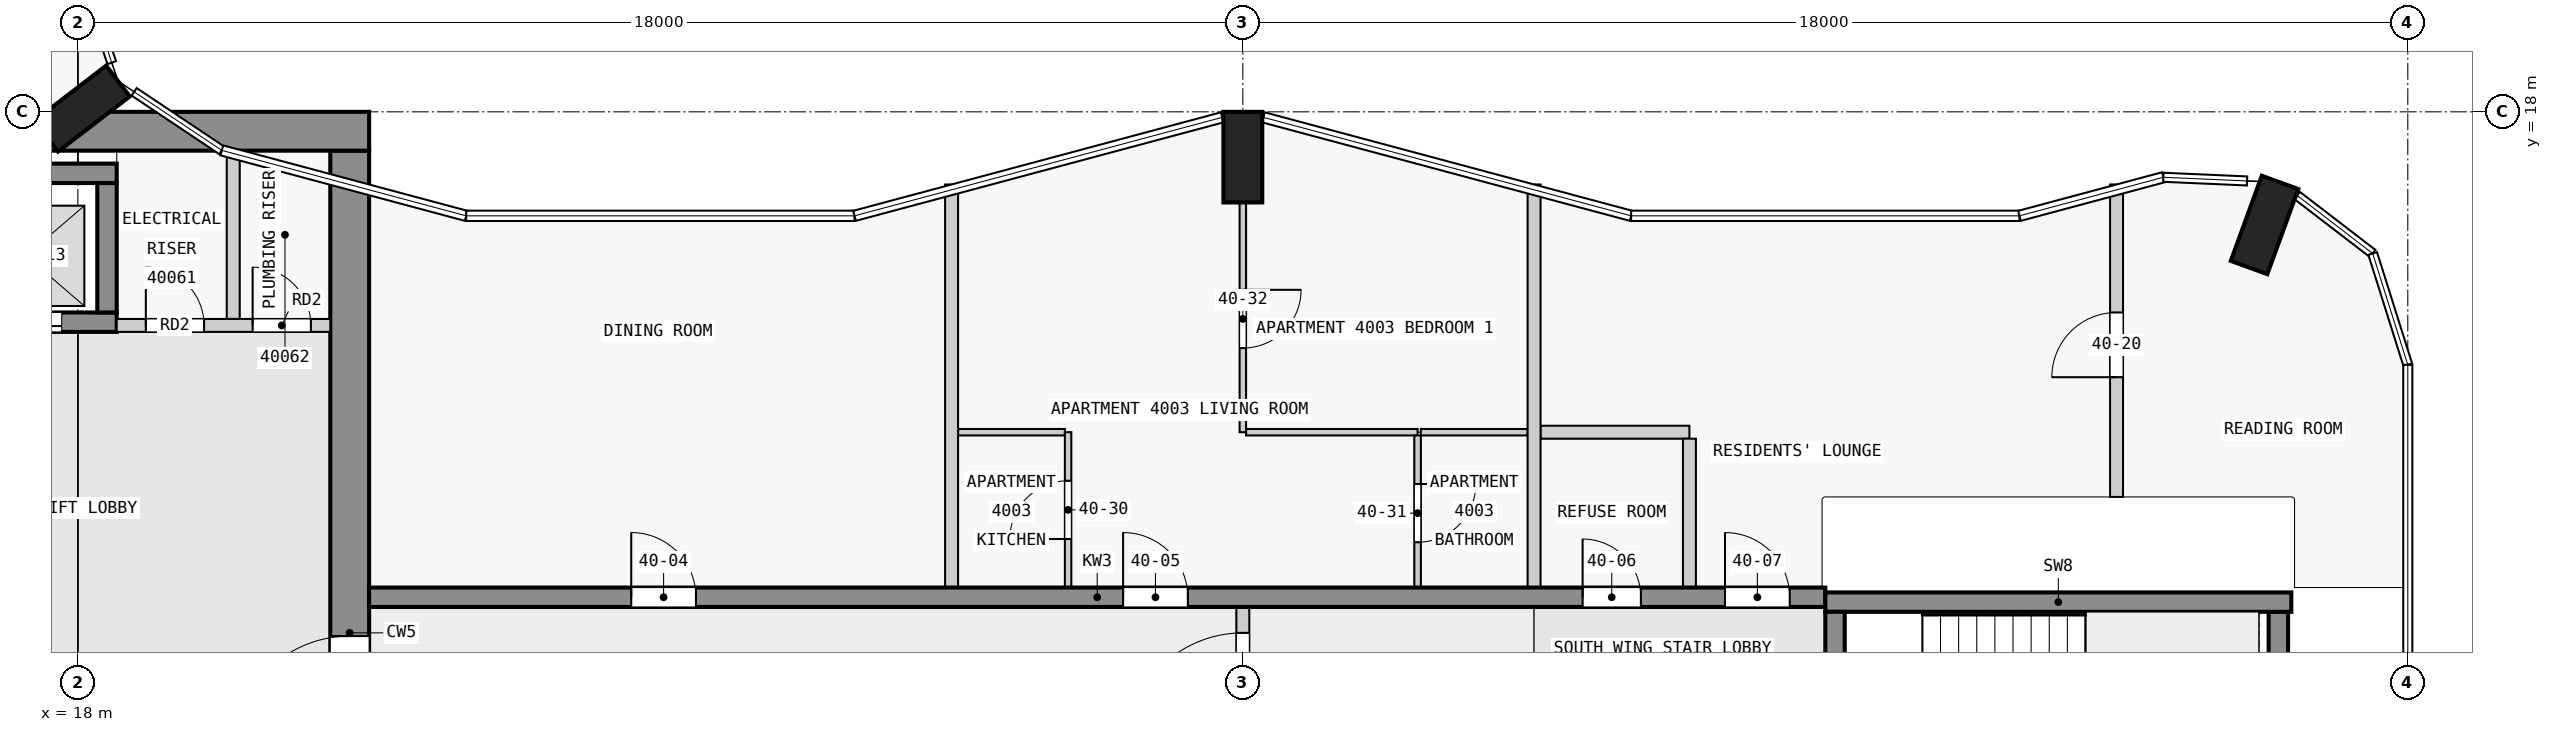
"""IFC4 building model, lengths in metres.
Left out: names, types, materials, properties, quantities, classifications, styles, units other than length and angle.
Written with IfcOpenShell. Run it as: python <this file> out.ifc"""

import sys

from ifc_helpers import new_model, si_unit, direction, frame, frame_2d, origin, origin_2d, place, context, subcontext, project, spatial, rectangle, extrude, element, fill, save


model = new_model("IFC4")
c1 = context("Model", 3, precision=1e-05, world=origin(), true_north=direction((0.0, 1.0)))
c2 = subcontext(c1, "Body", "Model", "MODEL_VIEW")
j1 = project(units=[si_unit("LENGTHUNIT", "METRE"), si_unit("PLANEANGLEUNIT", "RADIAN")], contexts=[c1])
p1 = place(None, origin())
s1 = spatial("IfcSite", under=j1, at=p1, CompositionType="ELEMENT")
p2 = place(p1, origin())
s2 = spatial("IfcBuilding", under=s1, at=p2, CompositionType="ELEMENT")
p3 = place(p2, frame((0.0, 0.0, 156.9)))
s3 = spatial("IfcBuildingStorey", under=s2, at=p3, CompositionType="ELEMENT", Elevation=156.9)
for number, where, z_axis, x_axis in (
    (1, (51.787, 16.252, 0.0), (0.0, 0.0, 1.0), (-0.94, 0.342, 0.0)),
    (2, (36.0, 17.3, 0.0), (0.0, 0.0, 1.0), (1.0, 0.0, 0.0)),
    (3, (18.065, 18.05, 0.0), (0.0, 0.0, 1.0), (-0.609, 0.793, 0.0)),
):
    element("IfcColumn", number, at=place(p3, frame(where, z_axis=z_axis, x_axis=x_axis)), inside=s3, PredefinedType="COLUMN", context=c2, shape_type="SweptSolid", body=[
        extrude(rectangle(XDim=0.6, YDim=1.4, at=origin_2d()), origin(), (0.0, 0.0, 1.0), 3.5),
    ])
p4 = place(p3, frame((1.38, 17.7, 0.0), z_axis=(0.0, 0.0, 1.0), x_axis=(1.0, 0.0, 0.0)))
e4 = element("IfcWall", 4, at=p4, inside=s3, PredefinedType="SHEAR", context=c2, shape_type="SweptSolid", body=[
    extrude(rectangle(XDim=21.12, YDim=0.6, at=frame_2d((10.56, 0.0))), origin(), (0.0, 0.0, 1.0), 3.25),
])
p5 = place(p4, frame((6.4, 0.0, 0.0)))
e5 = element("IfcOpeningElement", 5, at=p5, cuts=e4, PredefinedType="OPENING", context=c2, shape_type="SweptSolid", body=[
    extrude(rectangle(XDim=1.8, YDim=2.1, at=frame_2d((0.9, 1.05))), frame((0.0, 0.31, 0.0), z_axis=(0.0, -1.0, 0.0), x_axis=(1.0, 0.0, 0.0)), (0.0, 0.0, 1.0), 0.62),
])
p6 = place(p3, frame((22.2, 2.5, 0.0), z_axis=(0.0, 0.0, 1.0), x_axis=(0.0, 1.0, 0.0)))
e6 = element("IfcWall", 6, at=p6, inside=s3, PredefinedType="SHEAR", context=c2, shape_type="SweptSolid", body=[
    extrude(rectangle(XDim=14.9, YDim=0.6, at=frame_2d((7.45, 0.0))), origin(), (0.0, 0.0, 1.0), 3.25),
])
p7 = place(p6, frame((5.6, 0.0, 0.0)))
e7 = element("IfcOpeningElement", 7, at=p7, cuts=e6, PredefinedType="OPENING", context=c2, shape_type="SweptSolid", body=[
    extrude(rectangle(XDim=1.8, YDim=2.1, at=frame_2d((0.9, 1.05))), frame((0.0, 0.31, 0.0), z_axis=(0.0, -1.0, 0.0), x_axis=(1.0, 0.0, 0.0)), (0.0, 0.0, 1.0), 0.62),
])
p8 = place(p3, frame((10.8, 17.05, 0.0), z_axis=(0.0, 0.0, 1.0), x_axis=(1.0, 0.0, 0.0)))
e8 = element("IfcWall", 8, at=p8, inside=s3, PredefinedType="SHEAR", context=c2, shape_type="SweptSolid", body=[
    extrude(rectangle(XDim=7.8, YDim=0.3, at=frame_2d((3.9, 0.0))), origin(), (0.0, 0.0, 1.0), 3.25),
])
p9 = place(p3, frame((10.8, 14.75, 0.0), z_axis=(0.0, 0.0, 1.0), x_axis=(1.0, 0.0, 0.0)))
e9 = element("IfcWall", 9, at=p9, inside=s3, PredefinedType="SHEAR", context=c2, shape_type="SweptSolid", body=[
    extrude(rectangle(XDim=7.8, YDim=0.3, at=frame_2d((3.9, 0.0))), origin(), (0.0, 0.0, 1.0), 3.25),
])
p10 = place(p9, frame((0.85, 0.0, 0.0)))
e10 = element("IfcOpeningElement", 10, at=p10, cuts=e9, PredefinedType="OPENING", context=c2, shape_type="SweptSolid", body=[
    extrude(rectangle(XDim=1.1, YDim=2.1, at=frame_2d((0.55, 1.05))), frame((0.0, 0.16, 0.0), z_axis=(0.0, -1.0, 0.0), x_axis=(1.0, 0.0, 0.0)), (0.0, 0.0, 1.0), 0.32),
])
p11 = place(p9, frame((3.35, 0.0, 0.0)))
e11 = element("IfcOpeningElement", 11, at=p11, cuts=e9, PredefinedType="OPENING", context=c2, shape_type="SweptSolid", body=[
    extrude(rectangle(XDim=1.1, YDim=2.1, at=frame_2d((0.55, 1.05))), frame((0.0, 0.16, 0.0), z_axis=(0.0, -1.0, 0.0), x_axis=(1.0, 0.0, 0.0)), (0.0, 0.0, 1.0), 0.32),
])
p12 = place(p9, frame((5.85, 0.0, 0.0)))
e12 = element("IfcOpeningElement", 12, at=p12, cuts=e9, PredefinedType="OPENING", context=c2, shape_type="SweptSolid", body=[
    extrude(rectangle(XDim=1.1, YDim=2.1, at=frame_2d((0.55, 1.05))), frame((0.0, 0.16, 0.0), z_axis=(0.0, -1.0, 0.0), x_axis=(1.0, 0.0, 0.0)), (0.0, 0.0, 1.0), 0.32),
])
p13 = place(p3, frame((18.45, 14.9, 0.0), z_axis=(0.0, 0.0, 1.0), x_axis=(0.0, 1.0, 0.0)))
e13 = element("IfcWall", 13, at=p13, inside=s3, PredefinedType="SHEAR", context=c2, shape_type="SweptSolid", body=[
    extrude(rectangle(XDim=2.0, YDim=0.3, at=frame_2d((1.0, 0.0))), origin(), (0.0, 0.0, 1.0), 3.25),
])
p14 = place(p3, frame((45.15, 7.725, 0.0), z_axis=(0.0, 0.0, 1.0), x_axis=(0.0, 1.0, 0.0)))
e14 = element("IfcWall", 14, at=p14, inside=s3, PredefinedType="SHEAR", context=c2, shape_type="SweptSolid", body=[
    extrude(rectangle(XDim=2.55, YDim=0.3, at=frame_2d((1.275, 0.0))), origin(), (0.0, 0.0, 1.0), 3.5),
])
p15 = place(p14, frame((0.725, 0.0, 0.0)))
e15 = element("IfcOpeningElement", 15, at=p15, cuts=e14, PredefinedType="OPENING", context=c2, shape_type="SweptSolid", body=[
    extrude(rectangle(XDim=1.1, YDim=2.1, at=frame_2d((0.55, 1.05))), frame((0.0, 0.16, 0.0), z_axis=(0.0, -1.0, 0.0), x_axis=(1.0, 0.0, 0.0)), (0.0, 0.0, 1.0), 0.32),
])
p16 = place(p3, frame((52.0, 7.725, 0.0), z_axis=(0.0, 0.0, 1.0), x_axis=(0.0, 1.0, 0.0)))
e16 = element("IfcWall", 16, at=p16, inside=s3, PredefinedType="SHEAR", context=c2, shape_type="SweptSolid", body=[
    extrude(rectangle(XDim=2.55, YDim=0.3, at=frame_2d((1.275, 0.0))), origin(), (0.0, 0.0, 1.0), 3.5),
])
p17 = place(p3, frame((45.0, 10.425, 0.0), z_axis=(0.0, 0.0, 1.0), x_axis=(1.0, 0.0, 0.0)))
e17 = element("IfcWall", 17, at=p17, inside=s3, PredefinedType="SHEAR", context=c2, shape_type="SweptSolid", body=[
    extrude(rectangle(XDim=7.2, YDim=0.3, at=frame_2d((3.6, 0.0))), origin(), (0.0, 0.0, 1.0), 3.5),
])
p18 = place(p3, frame((22.5, 10.5, 0.0), z_axis=(0.0, 0.0, 1.0), x_axis=(1.0, 0.0, 0.0)))
e18 = element("IfcWall", 18, at=p18, inside=s3, PredefinedType="SHEAR", context=c2, shape_type="SweptSolid", body=[
    extrude(rectangle(XDim=22.5, YDim=0.3, at=frame_2d((11.25, 0.0))), origin(), (0.0, 0.0, 1.0), 3.25),
])
p19 = place(p18, frame((4.05, 0.0, 0.0)))
e19 = element("IfcOpeningElement", 19, at=p19, cuts=e18, PredefinedType="OPENING", context=c2, shape_type="SweptSolid", body=[
    extrude(rectangle(XDim=1.0, YDim=2.1, at=frame_2d((0.5, 1.05))), frame((0.0, 0.16, 0.0), z_axis=(0.0, -1.0, 0.0), x_axis=(1.0, 0.0, 0.0)), (0.0, 0.0, 1.0), 0.32),
])
p20 = place(p18, frame((11.65, 0.0, 0.0)))
e20 = element("IfcOpeningElement", 20, at=p20, cuts=e18, PredefinedType="OPENING", context=c2, shape_type="SweptSolid", body=[
    extrude(rectangle(XDim=1.0, YDim=2.1, at=frame_2d((0.5, 1.05))), frame((0.0, 0.16, 0.0), z_axis=(0.0, -1.0, 0.0), x_axis=(1.0, 0.0, 0.0)), (0.0, 0.0, 1.0), 0.32),
])
p21 = place(p18, frame((18.75, 0.0, 0.0)))
e21 = element("IfcOpeningElement", 21, at=p21, cuts=e18, PredefinedType="OPENING", context=c2, shape_type="SweptSolid", body=[
    extrude(rectangle(XDim=0.9, YDim=2.1, at=frame_2d((0.45, 1.05))), frame((0.0, 0.16, 0.0), z_axis=(0.0, -1.0, 0.0), x_axis=(1.0, 0.0, 0.0)), (0.0, 0.0, 1.0), 0.32),
])
p22 = place(p18, frame((20.95, 0.0, 0.0)))
e22 = element("IfcOpeningElement", 22, at=p22, cuts=e18, PredefinedType="OPENING", context=c2, shape_type="SweptSolid", body=[
    extrude(rectangle(XDim=1.0, YDim=2.1, at=frame_2d((0.5, 1.05))), frame((0.0, 0.16, 0.0), z_axis=(0.0, -1.0, 0.0), x_axis=(1.0, 0.0, 0.0)), (0.0, 0.0, 1.0), 0.32),
])
p23 = place(p3, frame((18.6, 14.7, 0.0), z_axis=(0.0, 0.0, 1.0), x_axis=(1.0, 0.0, 0.0)))
e23 = element("IfcWall", 23, at=p23, inside=s3, PredefinedType="PARTITIONING", context=c2, shape_type="SweptSolid", body=[
    extrude(rectangle(XDim=3.3, YDim=0.2, at=frame_2d((1.65, 0.0))), origin(), (0.0, 0.0, 1.0), 3.25),
])
p24 = place(p23, frame((0.45, 0.0, 0.0)))
e24 = element("IfcOpeningElement", 24, at=p24, cuts=e23, PredefinedType="OPENING", context=c2, shape_type="SweptSolid", body=[
    extrude(rectangle(XDim=0.9, YDim=2.1, at=frame_2d((0.45, 1.05))), frame((0.0, 0.11, 0.0), z_axis=(0.0, -1.0, 0.0), x_axis=(1.0, 0.0, 0.0)), (0.0, 0.0, 1.0), 0.22),
])
p25 = place(p23, frame((2.1, 0.0, 0.0)))
e25 = element("IfcOpeningElement", 25, at=p25, cuts=e23, PredefinedType="OPENING", context=c2, shape_type="SweptSolid", body=[
    extrude(rectangle(XDim=0.9, YDim=2.1, at=frame_2d((0.45, 1.05))), frame((0.0, 0.11, 0.0), z_axis=(0.0, -1.0, 0.0), x_axis=(1.0, 0.0, 0.0)), (0.0, 0.0, 1.0), 0.22),
])
p26 = place(p3, frame((20.4, 14.8, 0.0), z_axis=(0.0, 0.0, 1.0), x_axis=(0.0, 1.0, 0.0)))
e26 = element("IfcWall", 26, at=p26, inside=s3, PredefinedType="PARTITIONING", context=c2, shape_type="SweptSolid", body=[
    extrude(rectangle(XDim=2.6, YDim=0.2, at=frame_2d((1.3, 0.0))), origin(), (0.0, 0.0, 1.0), 3.25),
])
for number, where, z_axis, x_axis in (
    (27, (33.25, 13.05, 0.0), (0.0, 0.0, 1.0), (-1.0, 0.0, 0.0)),
    (28, (40.4, 13.05, 0.0), (0.0, 0.0, 1.0), (-1.0, 0.0, 0.0)),
):
    element("IfcWall", number, at=place(p3, frame(where, z_axis=z_axis, x_axis=x_axis)), inside=s3, PredefinedType="PARTITIONING", context=c2, shape_type="SweptSolid", body=[
        extrude(rectangle(XDim=1.65, YDim=0.1, at=frame_2d((0.825, 0.0))), origin(), (0.0, 0.0, 1.0), 3.25),
    ])
p27 = place(p3, frame((36.05, 13.05, 0.0), z_axis=(0.0, 0.0, 1.0), x_axis=(1.0, 0.0, 0.0)))
e29 = element("IfcWall", 29, at=p27, inside=s3, PredefinedType="PARTITIONING", context=c2, shape_type="SweptSolid", body=[
    extrude(rectangle(XDim=2.65, YDim=0.1, at=frame_2d((1.325, 0.0))), origin(), (0.0, 0.0, 1.0), 3.25),
])
p28 = place(p3, frame((42.9, 13.05, 0.0), z_axis=(0.0, 0.0, 1.0), x_axis=(-1.0, 0.0, 0.0)))
e30 = element("IfcWall", 30, at=p28, inside=s3, PredefinedType="PARTITIONING", context=c2, shape_type="SweptSolid", body=[
    extrude(rectangle(XDim=2.3, YDim=0.2, at=frame_2d((1.15, 0.0))), origin(), (0.0, 0.0, 1.0), 3.25),
])
p29 = place(p3, frame((31.5, 10.65, 0.0), z_axis=(0.0, 0.0, 1.0), x_axis=(0.0, 1.0, 0.0)))
e31 = element("IfcWall", 31, at=p29, inside=s3, PredefinedType="PARTITIONING", context=c2, shape_type="SweptSolid", body=[
    extrude(rectangle(XDim=6.228, YDim=0.2, at=frame_2d((3.114, 0.0))), origin(), (0.0, 0.0, 1.0), 3.25),
])
p30 = place(p3, frame((33.3, 10.65, 0.0), z_axis=(0.0, 0.0, 1.0), x_axis=(0.0, 1.0, 0.0)))
e32 = element("IfcWall", 32, at=p30, inside=s3, PredefinedType="PARTITIONING", context=c2, shape_type="SweptSolid", body=[
    extrude(rectangle(XDim=2.4, YDim=0.1, at=frame_2d((1.2, 0.0))), origin(), (0.0, 0.0, 1.0), 3.25),
])
p31 = place(p30, frame((0.75, 0.0, 0.0)))
e33 = element("IfcOpeningElement", 33, at=p31, cuts=e32, PredefinedType="OPENING", context=c2, shape_type="SweptSolid", body=[
    extrude(rectangle(XDim=0.9, YDim=2.1, at=frame_2d((0.45, 1.05))), frame((0.0, 0.06, 0.0), z_axis=(0.0, -1.0, 0.0), x_axis=(1.0, 0.0, 0.0)), (0.0, 0.0, 1.0), 0.12),
])
p32 = place(p3, frame((36.0, 16.6, 0.0), z_axis=(0.0, 0.0, 1.0), x_axis=(0.0, -1.0, 0.0)))
e34 = element("IfcWall", 34, at=p32, inside=s3, PredefinedType="PARTITIONING", context=c2, shape_type="SweptSolid", body=[
    extrude(rectangle(XDim=3.55, YDim=0.1, at=frame_2d((1.775, 0.0))), origin(), (0.0, 0.0, 1.0), 3.25),
])
p33 = place(p32, frame((1.35, 0.0, 0.0)))
e35 = element("IfcOpeningElement", 35, at=p33, cuts=e34, PredefinedType="OPENING", context=c2, shape_type="SweptSolid", body=[
    extrude(rectangle(XDim=0.9, YDim=2.1, at=frame_2d((0.45, 1.05))), frame((0.0, 0.06, 0.0), z_axis=(0.0, -1.0, 0.0), x_axis=(1.0, 0.0, 0.0)), (0.0, 0.0, 1.0), 0.12),
])
p34 = place(p3, frame((38.7, 13.0, 0.0), z_axis=(0.0, 0.0, 1.0), x_axis=(0.0, -1.0, 0.0)))
e36 = element("IfcWall", 36, at=p34, inside=s3, PredefinedType="PARTITIONING", context=c2, shape_type="SweptSolid", body=[
    extrude(rectangle(XDim=2.35, YDim=0.1, at=frame_2d((1.175, 0.0))), origin(), (0.0, 0.0, 1.0), 3.25),
])
p35 = place(p34, frame((0.75, 0.0, 0.0)))
e37 = element("IfcOpeningElement", 37, at=p35, cuts=e36, PredefinedType="OPENING", context=c2, shape_type="SweptSolid", body=[
    extrude(rectangle(XDim=0.9, YDim=2.1, at=frame_2d((0.45, 1.05))), frame((0.0, 0.06, 0.0), z_axis=(0.0, -1.0, 0.0), x_axis=(1.0, 0.0, 0.0)), (0.0, 0.0, 1.0), 0.12),
])
p36 = place(p3, frame((40.5, 10.65, 0.0), z_axis=(0.0, 0.0, 1.0), x_axis=(0.0, 1.0, 0.0)))
e38 = element("IfcWall", 38, at=p36, inside=s3, PredefinedType="PARTITIONING", context=c2, shape_type="SweptSolid", body=[
    extrude(rectangle(XDim=6.228, YDim=0.2, at=frame_2d((3.114, 0.0))), origin(), (0.0, 0.0, 1.0), 3.25),
])
p37 = place(p3, frame((42.9, 10.65, 0.0), z_axis=(0.0, 0.0, 1.0), x_axis=(0.0, 1.0, 0.0)))
e39 = element("IfcWall", 39, at=p37, inside=s3, PredefinedType="PARTITIONING", context=c2, shape_type="SweptSolid", body=[
    extrude(rectangle(XDim=2.3, YDim=0.2, at=frame_2d((1.15, 0.0))), origin(), (0.0, 0.0, 1.0), 3.25),
])
p38 = place(p3, frame((49.5, 12.05, 0.0), z_axis=(0.0, 0.0, 1.0), x_axis=(0.0, 1.0, 0.0)))
e40 = element("IfcWall", 40, at=p38, inside=s3, PredefinedType="PARTITIONING", context=c2, shape_type="SweptSolid", body=[
    extrude(rectangle(XDim=4.828, YDim=0.2, at=frame_2d((2.414, 0.0))), origin(), (0.0, 0.0, 1.0), 3.25),
])
p39 = place(p38, frame((1.85, 0.0, 0.0)))
e41 = element("IfcOpeningElement", 41, at=p39, cuts=e40, PredefinedType="OPENING", context=c2, shape_type="SweptSolid", body=[
    extrude(rectangle(XDim=1.0, YDim=2.1, at=frame_2d((0.5, 1.05))), frame((0.0, 0.11, 0.0), z_axis=(0.0, -1.0, 0.0), x_axis=(1.0, 0.0, 0.0)), (0.0, 0.0, 1.0), 0.22),
])
p40 = place(p3, frame((36.0, 7.45, 0.0), z_axis=(0.0, 0.0, 1.0), x_axis=(0.0, 1.0, 0.0)))
e42 = element("IfcWall", 42, at=p40, inside=s3, PredefinedType="PARTITIONING", context=c2, shape_type="SweptSolid", body=[
    extrude(rectangle(XDim=3.2, YDim=0.2, at=frame_2d((1.6, 0.0))), origin(), (0.0, 0.0, 1.0), 3.25),
])
p41 = place(p40, frame((0.7, 0.0, 0.0)))
e43 = element("IfcOpeningElement", 43, at=p41, cuts=e42, PredefinedType="OPENING", context=c2, shape_type="SweptSolid", body=[
    extrude(rectangle(XDim=1.8, YDim=2.1, at=frame_2d((0.9, 1.05))), frame((0.0, 0.11, 0.0), z_axis=(0.0, -1.0, 0.0), x_axis=(1.0, 0.0, 0.0)), (0.0, 0.0, 1.0), 0.22),
])
p42 = place(p12, origin())
e44 = element("IfcDoor", 44, at=p42, inside=s3, OperationType="DOUBLE_DOOR_SLIDING", PredefinedType="DOOR", context=c2, shape_type="SweptSolid", body=[
    extrude(rectangle(XDim=1.1, YDim=2.1, at=frame_2d((0.55, 1.05))), frame((0.0, 0.025, 0.0), z_axis=(0.0, -1.0, 0.0), x_axis=(1.0, 0.0, 0.0)), (0.0, 0.0, 1.0), 0.05),
])
fill(e12, e44)
p43 = place(p7, origin())
e45 = element("IfcDoor", 45, at=p43, inside=s3, OperationType="DOUBLE_DOOR_SINGLE_SWING", PredefinedType="DOOR", context=c2, shape_type="SweptSolid", body=[
    extrude(rectangle(XDim=1.8, YDim=2.1, at=frame_2d((0.9, 1.05))), frame((0.0, 0.025, 0.0), z_axis=(0.0, -1.0, 0.0), x_axis=(1.0, 0.0, 0.0)), (0.0, 0.0, 1.0), 0.05),
])
fill(e7, e45)
p44 = place(p24, origin())
e46 = element("IfcDoor", 46, at=p44, inside=s3, OperationType="SINGLE_SWING_LEFT", PredefinedType="DOOR", context=c2, shape_type="SweptSolid", body=[
    extrude(rectangle(XDim=0.9, YDim=2.1, at=frame_2d((0.45, 1.05))), frame((0.0, 0.025, 0.0), z_axis=(0.0, -1.0, 0.0), x_axis=(1.0, 0.0, 0.0)), (0.0, 0.0, 1.0), 0.05),
])
fill(e24, e46)
p45 = place(p25, origin())
e47 = element("IfcDoor", 47, at=p45, inside=s3, OperationType="SINGLE_SWING_LEFT", PredefinedType="DOOR", context=c2, shape_type="SweptSolid", body=[
    extrude(rectangle(XDim=0.9, YDim=2.1, at=frame_2d((0.45, 1.05))), frame((0.0, 0.025, 0.0), z_axis=(0.0, -1.0, 0.0), x_axis=(1.0, 0.0, 0.0)), (0.0, 0.0, 1.0), 0.05),
])
fill(e25, e47)
p46 = place(p19, origin())
e48 = element("IfcDoor", 48, at=p46, inside=s3, OperationType="SINGLE_SWING_LEFT", PredefinedType="DOOR", context=c2, shape_type="SweptSolid", body=[
    extrude(rectangle(XDim=1.0, YDim=2.1, at=frame_2d((0.5, 1.05))), frame((0.0, 0.025, 0.0), z_axis=(0.0, -1.0, 0.0), x_axis=(1.0, 0.0, 0.0)), (0.0, 0.0, 1.0), 0.05),
])
fill(e19, e48)
p47 = place(p20, origin())
e49 = element("IfcDoor", 49, at=p47, inside=s3, OperationType="SINGLE_SWING_RIGHT", PredefinedType="DOOR", context=c2, shape_type="SweptSolid", body=[
    extrude(rectangle(XDim=1.0, YDim=2.1, at=frame_2d((0.5, 1.05))), frame((0.0, 0.025, 0.0), z_axis=(0.0, -1.0, 0.0), x_axis=(1.0, 0.0, 0.0)), (0.0, 0.0, 1.0), 0.05),
])
fill(e20, e49)
p48 = place(p21, origin())
e50 = element("IfcDoor", 50, at=p48, inside=s3, OperationType="SINGLE_SWING_RIGHT", PredefinedType="DOOR", context=c2, shape_type="SweptSolid", body=[
    extrude(rectangle(XDim=0.9, YDim=2.1, at=frame_2d((0.45, 1.05))), frame((0.0, 0.025, 0.0), z_axis=(0.0, -1.0, 0.0), x_axis=(1.0, 0.0, 0.0)), (0.0, 0.0, 1.0), 0.05),
])
fill(e21, e50)
p49 = place(p22, origin())
e51 = element("IfcDoor", 51, at=p49, inside=s3, OperationType="SINGLE_SWING_RIGHT", PredefinedType="DOOR", context=c2, shape_type="SweptSolid", body=[
    extrude(rectangle(XDim=1.0, YDim=2.1, at=frame_2d((0.5, 1.05))), frame((0.0, 0.025, 0.0), z_axis=(0.0, -1.0, 0.0), x_axis=(1.0, 0.0, 0.0)), (0.0, 0.0, 1.0), 0.05),
])
fill(e22, e51)
p50 = place(p41, origin())
e52 = element("IfcDoor", 52, at=p50, inside=s3, OperationType="SINGLE_SWING_LEFT", PredefinedType="DOOR", context=c2, shape_type="SweptSolid", body=[
    extrude(rectangle(XDim=1.8, YDim=2.1, at=frame_2d((0.9, 1.05))), frame((0.0, 0.025, 0.0), z_axis=(0.0, -1.0, 0.0), x_axis=(1.0, 0.0, 0.0)), (0.0, 0.0, 1.0), 0.05),
])
fill(e43, e52)
p51 = place(p39, origin())
e53 = element("IfcDoor", 53, at=p51, inside=s3, OperationType="SINGLE_SWING_LEFT", PredefinedType="DOOR", context=c2, shape_type="SweptSolid", body=[
    extrude(rectangle(XDim=1.0, YDim=2.1, at=frame_2d((0.5, 1.05))), frame((0.0, 0.025, 0.0), z_axis=(0.0, -1.0, 0.0), x_axis=(1.0, 0.0, 0.0)), (0.0, 0.0, 1.0), 0.05),
])
fill(e41, e53)
p52 = place(p31, origin())
e54 = element("IfcDoor", 54, at=p52, inside=s3, OperationType="SINGLE_SWING_LEFT", PredefinedType="DOOR", context=c2, shape_type="SweptSolid", body=[
    extrude(rectangle(XDim=0.9, YDim=2.1, at=frame_2d((0.45, 1.05))), frame((0.0, 0.025, 0.0), z_axis=(0.0, -1.0, 0.0), x_axis=(1.0, 0.0, 0.0)), (0.0, 0.0, 1.0), 0.05),
])
fill(e33, e54)
p53 = place(p35, origin())
e55 = element("IfcDoor", 55, at=p53, inside=s3, OperationType="SINGLE_SWING_RIGHT", PredefinedType="DOOR", context=c2, shape_type="SweptSolid", body=[
    extrude(rectangle(XDim=0.9, YDim=2.1, at=frame_2d((0.45, 1.05))), frame((0.0, 0.025, 0.0), z_axis=(0.0, -1.0, 0.0), x_axis=(1.0, 0.0, 0.0)), (0.0, 0.0, 1.0), 0.05),
])
fill(e37, e55)
p54 = place(p33, origin())
e56 = element("IfcDoor", 56, at=p54, inside=s3, OperationType="SINGLE_SWING_RIGHT", PredefinedType="DOOR", context=c2, shape_type="SweptSolid", body=[
    extrude(rectangle(XDim=0.9, YDim=2.1, at=frame_2d((0.45, 1.05))), frame((0.0, 0.025, 0.0), z_axis=(0.0, -1.0, 0.0), x_axis=(1.0, 0.0, 0.0)), (0.0, 0.0, 1.0), 0.05),
])
fill(e35, e56)
save(model, sys.argv[1])
